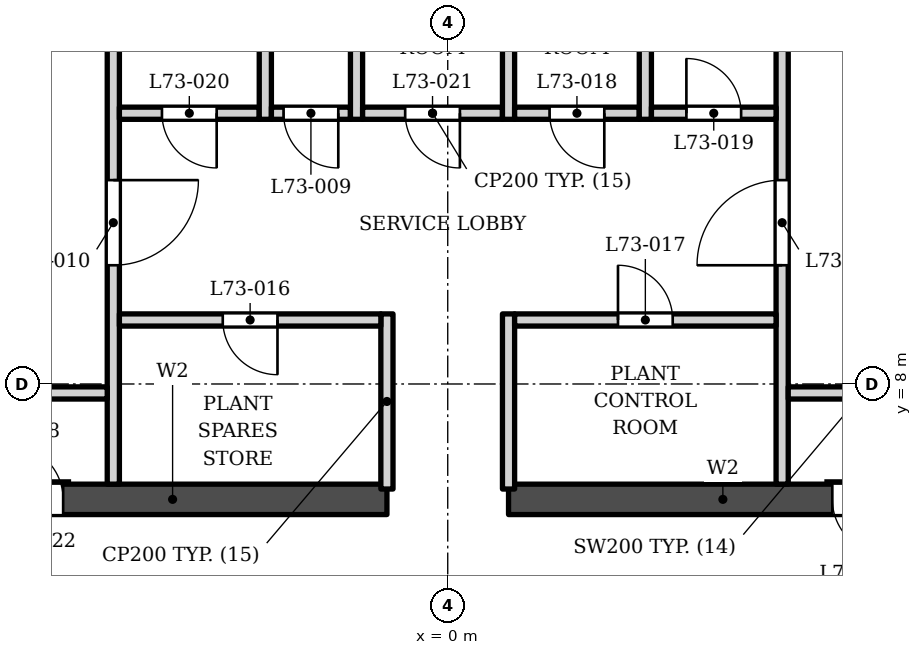
"""IFC4 building model, lengths in metres.
Left out: names, types, materials, properties, quantities, classifications, styles, units other than length and angle.
Written with IfcOpenShell. Run it as: python <this file> out.ifc"""

import sys

from ifc_helpers import new_model, si_unit, direction, frame, frame_2d, origin, place, context, subcontext, project, spatial, rectangle, extrude, element, fill, save


model = new_model("IFC4")
c1 = context("Model", 3, precision=1e-05, world=origin(), true_north=direction((0.0, 1.0)))
c2 = subcontext(c1, "Body", "Model", "MODEL_VIEW")
j1 = project(units=[si_unit("LENGTHUNIT", "METRE"), si_unit("PLANEANGLEUNIT", "RADIAN")], contexts=[c1])
p1 = place(None, origin())
s1 = spatial("IfcSite", under=j1, at=p1, CompositionType="ELEMENT")
p2 = place(p1, origin())
s2 = spatial("IfcBuilding", under=s1, at=p2, CompositionType="ELEMENT")
p3 = place(p2, frame((0.0, 0.0, 310.5)))
s3 = spatial("IfcBuildingStorey", under=s2, at=p3, CompositionType="ELEMENT", Elevation=310.5)
p4 = place(p3, frame((-8.05, 6.103, 0.0), z_axis=(0.0, 0.0, 1.0), x_axis=(1.0, 0.0, 0.0)))
e1 = element("IfcWall", 1, at=p4, inside=s3, PredefinedType="SHEAR", context=c2, shape_type="SweptSolid", body=[
    extrude(rectangle(XDim=7.05, YDim=0.5, at=frame_2d((3.525, 0.0))), origin(), (0.0, 0.0, 1.0), 5.0),
])
p5 = place(p4, frame((0.825, 0.0, 0.0)))
e2 = element("IfcOpeningElement", 2, at=p5, cuts=e1, PredefinedType="OPENING", context=c2, shape_type="SweptSolid", body=[
    extrude(rectangle(XDim=0.9, YDim=2.1, at=frame_2d((0.45, 1.05))), frame((0.0, 0.26, 0.0), z_axis=(0.0, -1.0, 0.0), x_axis=(1.0, 0.0, 0.0)), (0.0, 0.0, 1.0), 0.52),
])
p6 = place(p3, frame((1.0, 6.103, 0.0), z_axis=(0.0, 0.0, 1.0), x_axis=(1.0, 0.0, 0.0)))
e3 = element("IfcWall", 3, at=p6, inside=s3, PredefinedType="SHEAR", context=c2, shape_type="SweptSolid", body=[
    extrude(rectangle(XDim=7.05, YDim=0.5, at=frame_2d((3.525, 0.0))), origin(), (0.0, 0.0, 1.0), 5.0),
])
p7 = place(p6, frame((5.325, 0.0, 0.0)))
e4 = element("IfcOpeningElement", 4, at=p7, cuts=e3, PredefinedType="OPENING", context=c2, shape_type="SweptSolid", body=[
    extrude(rectangle(XDim=0.9, YDim=2.1, at=frame_2d((0.45, 1.05))), frame((0.0, 0.26, 0.0), z_axis=(0.0, -1.0, 0.0), x_axis=(1.0, 0.0, 0.0)), (0.0, 0.0, 1.0), 0.52),
])
for number, where, z_axis, x_axis in (
    (5, (-1.0, 6.273, 0.0), (0.0, 0.0, 1.0), (0.0, 1.0, 0.0)),
    (6, (1.0, 6.273, 0.0), (0.0, 0.0, 1.0), (0.0, 1.0, 0.0)),
):
    element("IfcWall", number, at=place(p3, frame(where, z_axis=z_axis, x_axis=x_axis)), inside=s3, PredefinedType="PARTITIONING", context=c2, shape_type="SweptSolid", body=[
        extrude(rectangle(XDim=2.88, YDim=0.2, at=frame_2d((1.44, 0.0))), origin(), (0.0, 0.0, 1.0), 4.8),
    ])
p8 = place(p3, frame((-5.5, 6.353, 0.0), z_axis=(0.0, 0.0, 1.0), x_axis=(0.0, 1.0, 0.0)))
e7 = element("IfcWall", 7, at=p8, inside=s3, PredefinedType="SOLIDWALL", context=c2, shape_type="SweptSolid", body=[
    extrude(rectangle(XDim=7.85, YDim=0.2, at=frame_2d((3.925, 0.0))), origin(), (0.0, 0.0, 1.0), 4.8),
])
p9 = place(p8, frame((3.6, 0.0, 0.0)))
e8 = element("IfcOpeningElement", 8, at=p9, cuts=e7, PredefinedType="OPENING", context=c2, shape_type="SweptSolid", body=[
    extrude(rectangle(XDim=1.4, YDim=2.1, at=frame_2d((0.7, 1.05))), frame((0.0, 0.11, 0.0), z_axis=(0.0, -1.0, 0.0), x_axis=(1.0, 0.0, 0.0)), (0.0, 0.0, 1.0), 0.22),
])
p10 = place(p3, frame((5.5, 6.353, 0.0), z_axis=(0.0, 0.0, 1.0), x_axis=(0.0, 1.0, 0.0)))
e9 = element("IfcWall", 9, at=p10, inside=s3, PredefinedType="SOLIDWALL", context=c2, shape_type="SweptSolid", body=[
    extrude(rectangle(XDim=7.85, YDim=0.2, at=frame_2d((3.925, 0.0))), origin(), (0.0, 0.0, 1.0), 4.8),
])
p11 = place(p10, frame((3.6, 0.0, 0.0)))
e10 = element("IfcOpeningElement", 10, at=p11, cuts=e9, PredefinedType="OPENING", context=c2, shape_type="SweptSolid", body=[
    extrude(rectangle(XDim=1.4, YDim=2.1, at=frame_2d((0.7, 1.05))), frame((0.0, 0.11, 0.0), z_axis=(0.0, -1.0, 0.0), x_axis=(1.0, 0.0, 0.0)), (0.0, 0.0, 1.0), 0.22),
])
for number, where, z_axis, x_axis in (
    (11, (-8.05, 7.853, 0.0), (0.0, 0.0, 1.0), (1.0, 0.0, 0.0)),
    (12, (5.6, 7.853, 0.0), (0.0, 0.0, 1.0), (1.0, 0.0, 0.0)),
):
    element("IfcWall", number, at=place(p3, frame(where, z_axis=z_axis, x_axis=x_axis)), inside=s3, PredefinedType="SOLIDWALL", context=c2, shape_type="SweptSolid", body=[
        extrude(rectangle(XDim=2.45, YDim=0.2, at=frame_2d((1.225, 0.0))), origin(), (0.0, 0.0, 1.0), 4.8),
    ])
p12 = place(p3, frame((-5.4, 9.052, 0.0), z_axis=(0.0, 0.0, 1.0), x_axis=(1.0, 0.0, 0.0)))
e13 = element("IfcWall", 13, at=p12, inside=s3, PredefinedType="PARTITIONING", context=c2, shape_type="SweptSolid", body=[
    extrude(rectangle(XDim=4.3, YDim=0.2, at=frame_2d((2.15, 0.0))), origin(), (0.0, 0.0, 1.0), 4.8),
])
p13 = place(p12, frame((1.7, 0.0, 0.0)))
e14 = element("IfcOpeningElement", 14, at=p13, cuts=e13, PredefinedType="OPENING", context=c2, shape_type="SweptSolid", body=[
    extrude(rectangle(XDim=0.9, YDim=2.1, at=frame_2d((0.45, 1.05))), frame((0.0, 0.11, 0.0), z_axis=(0.0, -1.0, 0.0), x_axis=(1.0, 0.0, 0.0)), (0.0, 0.0, 1.0), 0.22),
])
p14 = place(p3, frame((1.1, 9.052, 0.0), z_axis=(0.0, 0.0, 1.0), x_axis=(1.0, 0.0, 0.0)))
e15 = element("IfcWall", 15, at=p14, inside=s3, PredefinedType="PARTITIONING", context=c2, shape_type="SweptSolid", body=[
    extrude(rectangle(XDim=4.3, YDim=0.2, at=frame_2d((2.15, 0.0))), origin(), (0.0, 0.0, 1.0), 4.8),
])
p15 = place(p14, frame((1.7, 0.0, 0.0)))
e16 = element("IfcOpeningElement", 16, at=p15, cuts=e15, PredefinedType="OPENING", context=c2, shape_type="SweptSolid", body=[
    extrude(rectangle(XDim=0.9, YDim=2.1, at=frame_2d((0.45, 1.05))), frame((0.0, 0.11, 0.0), z_axis=(0.0, -1.0, 0.0), x_axis=(1.0, 0.0, 0.0)), (0.0, 0.0, 1.0), 0.22),
])
p16 = place(p3, frame((-5.4, 12.453, 0.0), z_axis=(0.0, 0.0, 1.0), x_axis=(1.0, 0.0, 0.0)))
e17 = element("IfcWall", 17, at=p16, inside=s3, PredefinedType="PARTITIONING", context=c2, shape_type="SweptSolid", body=[
    extrude(rectangle(XDim=2.3, YDim=0.2, at=frame_2d((1.15, 0.0))), origin(), (0.0, 0.0, 1.0), 4.8),
])
p17 = place(p16, frame((0.7, 0.0, 0.0)))
e18 = element("IfcOpeningElement", 18, at=p17, cuts=e17, PredefinedType="OPENING", context=c2, shape_type="SweptSolid", body=[
    extrude(rectangle(XDim=0.9, YDim=2.1, at=frame_2d((0.45, 1.05))), frame((0.0, 0.11, 0.0), z_axis=(0.0, -1.0, 0.0), x_axis=(1.0, 0.0, 0.0)), (0.0, 0.0, 1.0), 0.22),
])
p18 = place(p3, frame((-3.0, 12.353, 0.0), z_axis=(0.0, 0.0, 1.0), x_axis=(0.0, 1.0, 0.0)))
e19 = element("IfcWall", 19, at=p18, inside=s3, PredefinedType="PARTITIONING", context=c2, shape_type="SweptSolid", body=[
    extrude(rectangle(XDim=6.2, YDim=0.2, at=frame_2d((3.1, 0.0))), origin(), (0.0, 0.0, 1.0), 4.8),
])
p19 = place(p18, frame((3.425, 0.0, 0.0)))
e20 = element("IfcOpeningElement", 20, at=p19, cuts=e19, PredefinedType="OPENING", context=c2, shape_type="SweptSolid", body=[
    extrude(rectangle(XDim=0.9, YDim=2.1, at=frame_2d((0.45, 1.05))), frame((0.0, 0.11, 0.0), z_axis=(0.0, -1.0, 0.0), x_axis=(1.0, 0.0, 0.0)), (0.0, 0.0, 1.0), 0.22),
])
p20 = place(p18, frame((4.975, 0.0, 0.0)))
e21 = element("IfcOpeningElement", 21, at=p20, cuts=e19, PredefinedType="OPENING", context=c2, shape_type="SweptSolid", body=[
    extrude(rectangle(XDim=0.9, YDim=2.1, at=frame_2d((0.45, 1.05))), frame((0.0, 0.11, 0.0), z_axis=(0.0, -1.0, 0.0), x_axis=(1.0, 0.0, 0.0)), (0.0, 0.0, 1.0), 0.22),
])
p21 = place(p3, frame((-2.9, 12.453, 0.0), z_axis=(0.0, 0.0, 1.0), x_axis=(1.0, 0.0, 0.0)))
e22 = element("IfcWall", 22, at=p21, inside=s3, PredefinedType="PARTITIONING", context=c2, shape_type="SweptSolid", body=[
    extrude(rectangle(XDim=1.3, YDim=0.2, at=frame_2d((0.65, 0.0))), origin(), (0.0, 0.0, 1.0), 4.8),
])
p22 = place(p21, frame((0.2, 0.0, 0.0)))
e23 = element("IfcOpeningElement", 23, at=p22, cuts=e22, PredefinedType="OPENING", context=c2, shape_type="SweptSolid", body=[
    extrude(rectangle(XDim=0.9, YDim=2.1, at=frame_2d((0.45, 1.05))), frame((0.0, 0.11, 0.0), z_axis=(0.0, -1.0, 0.0), x_axis=(1.0, 0.0, 0.0)), (0.0, 0.0, 1.0), 0.22),
])
p23 = place(p3, frame((-1.5, 12.353, 0.0), z_axis=(0.0, 0.0, 1.0), x_axis=(0.0, 1.0, 0.0)))
e24 = element("IfcWall", 24, at=p23, inside=s3, PredefinedType="PARTITIONING", context=c2, shape_type="SweptSolid", body=[
    extrude(rectangle(XDim=6.2, YDim=0.2, at=frame_2d((3.1, 0.0))), origin(), (0.0, 0.0, 1.0), 4.8),
])
p24 = place(p23, frame((3.27, 0.0, 0.0)))
e25 = element("IfcOpeningElement", 25, at=p24, cuts=e24, PredefinedType="OPENING", context=c2, shape_type="SweptSolid", body=[
    extrude(rectangle(XDim=0.9, YDim=2.1, at=frame_2d((0.45, 1.05))), frame((0.0, 0.11, 0.0), z_axis=(0.0, -1.0, 0.0), x_axis=(1.0, 0.0, 0.0)), (0.0, 0.0, 1.0), 0.22),
])
p25 = place(p23, frame((4.82, 0.0, 0.0)))
e26 = element("IfcOpeningElement", 26, at=p25, cuts=e24, PredefinedType="OPENING", context=c2, shape_type="SweptSolid", body=[
    extrude(rectangle(XDim=0.9, YDim=2.1, at=frame_2d((0.45, 1.05))), frame((0.0, 0.11, 0.0), z_axis=(0.0, -1.0, 0.0), x_axis=(1.0, 0.0, 0.0)), (0.0, 0.0, 1.0), 0.22),
])
p26 = place(p3, frame((-1.4, 12.453, 0.0), z_axis=(0.0, 0.0, 1.0), x_axis=(1.0, 0.0, 0.0)))
e27 = element("IfcWall", 27, at=p26, inside=s3, PredefinedType="PARTITIONING", context=c2, shape_type="SweptSolid", body=[
    extrude(rectangle(XDim=2.3, YDim=0.2, at=frame_2d((1.15, 0.0))), origin(), (0.0, 0.0, 1.0), 4.8),
])
p27 = place(p26, frame((0.7, 0.0, 0.0)))
e28 = element("IfcOpeningElement", 28, at=p27, cuts=e27, PredefinedType="OPENING", context=c2, shape_type="SweptSolid", body=[
    extrude(rectangle(XDim=0.9, YDim=2.1, at=frame_2d((0.45, 1.05))), frame((0.0, 0.11, 0.0), z_axis=(0.0, -1.0, 0.0), x_axis=(1.0, 0.0, 0.0)), (0.0, 0.0, 1.0), 0.22),
])
p28 = place(p3, frame((1.0, 12.353, 0.0), z_axis=(0.0, 0.0, 1.0), x_axis=(0.0, 1.0, 0.0)))
e29 = element("IfcWall", 29, at=p28, inside=s3, PredefinedType="PARTITIONING", context=c2, shape_type="SweptSolid", body=[
    extrude(rectangle(XDim=3.2, YDim=0.2, at=frame_2d((1.6, 0.0))), origin(), (0.0, 0.0, 1.0), 4.8),
])
p29 = place(p3, frame((1.1, 12.453, 0.0), z_axis=(0.0, 0.0, 1.0), x_axis=(1.0, 0.0, 0.0)))
e30 = element("IfcWall", 30, at=p29, inside=s3, PredefinedType="PARTITIONING", context=c2, shape_type="SweptSolid", body=[
    extrude(rectangle(XDim=2.05, YDim=0.2, at=frame_2d((1.025, 0.0))), origin(), (0.0, 0.0, 1.0), 4.8),
])
p30 = place(p29, frame((0.575, 0.0, 0.0)))
e31 = element("IfcOpeningElement", 31, at=p30, cuts=e30, PredefinedType="OPENING", context=c2, shape_type="SweptSolid", body=[
    extrude(rectangle(XDim=0.9, YDim=2.1, at=frame_2d((0.45, 1.05))), frame((0.0, 0.11, 0.0), z_axis=(0.0, -1.0, 0.0), x_axis=(1.0, 0.0, 0.0)), (0.0, 0.0, 1.0), 0.22),
])
p31 = place(p3, frame((3.25, 12.353, 0.0), z_axis=(0.0, 0.0, 1.0), x_axis=(0.0, 1.0, 0.0)))
e32 = element("IfcWall", 32, at=p31, inside=s3, PredefinedType="PARTITIONING", context=c2, shape_type="SweptSolid", body=[
    extrude(rectangle(XDim=3.2, YDim=0.2, at=frame_2d((1.6, 0.0))), origin(), (0.0, 0.0, 1.0), 4.8),
])
p32 = place(p3, frame((3.35, 12.453, 0.0), z_axis=(0.0, 0.0, 1.0), x_axis=(1.0, 0.0, 0.0)))
e33 = element("IfcWall", 33, at=p32, inside=s3, PredefinedType="PARTITIONING", context=c2, shape_type="SweptSolid", body=[
    extrude(rectangle(XDim=2.05, YDim=0.2, at=frame_2d((1.025, 0.0))), origin(), (0.0, 0.0, 1.0), 4.8),
])
p33 = place(p32, frame((0.575, 0.0, 0.0)))
e34 = element("IfcOpeningElement", 34, at=p33, cuts=e33, PredefinedType="OPENING", context=c2, shape_type="SweptSolid", body=[
    extrude(rectangle(XDim=0.9, YDim=2.1, at=frame_2d((0.45, 1.05))), frame((0.0, 0.11, 0.0), z_axis=(0.0, -1.0, 0.0), x_axis=(1.0, 0.0, 0.0)), (0.0, 0.0, 1.0), 0.22),
])
p34 = place(p22, origin())
e35 = element("IfcDoor", 35, at=p34, inside=s3, OperationType="SINGLE_SWING_RIGHT", PredefinedType="DOOR", context=c2, shape_type="SweptSolid", body=[
    extrude(rectangle(XDim=0.9, YDim=2.1, at=frame_2d((0.45, 1.05))), frame((0.0, 0.025, 0.0), z_axis=(0.0, -1.0, 0.0), x_axis=(1.0, 0.0, 0.0)), (0.0, 0.0, 1.0), 0.05),
])
fill(e23, e35)
p35 = place(p9, origin())
e36 = element("IfcDoor", 36, at=p35, inside=s3, OperationType="SINGLE_SWING_RIGHT", PredefinedType="DOOR", context=c2, shape_type="SweptSolid", body=[
    extrude(rectangle(XDim=1.4, YDim=2.1, at=frame_2d((0.7, 1.05))), frame((0.0, 0.025, 0.0), z_axis=(0.0, -1.0, 0.0), x_axis=(1.0, 0.0, 0.0)), (0.0, 0.0, 1.0), 0.05),
])
fill(e8, e36)
p36 = place(p11, origin())
e37 = element("IfcDoor", 37, at=p36, inside=s3, OperationType="SINGLE_SWING_LEFT", PredefinedType="DOOR", context=c2, shape_type="SweptSolid", body=[
    extrude(rectangle(XDim=1.4, YDim=2.1, at=frame_2d((0.7, 1.05))), frame((0.0, 0.025, 0.0), z_axis=(0.0, -1.0, 0.0), x_axis=(1.0, 0.0, 0.0)), (0.0, 0.0, 1.0), 0.05),
])
fill(e10, e37)
p37 = place(p13, origin())
e38 = element("IfcDoor", 38, at=p37, inside=s3, OperationType="SINGLE_SWING_RIGHT", PredefinedType="DOOR", context=c2, shape_type="SweptSolid", body=[
    extrude(rectangle(XDim=0.9, YDim=2.1, at=frame_2d((0.45, 1.05))), frame((0.0, 0.025, 0.0), z_axis=(0.0, -1.0, 0.0), x_axis=(1.0, 0.0, 0.0)), (0.0, 0.0, 1.0), 0.05),
])
fill(e14, e38)
p38 = place(p15, origin())
e39 = element("IfcDoor", 39, at=p38, inside=s3, OperationType="SINGLE_SWING_LEFT", PredefinedType="DOOR", context=c2, shape_type="SweptSolid", body=[
    extrude(rectangle(XDim=0.9, YDim=2.1, at=frame_2d((0.45, 1.05))), frame((0.0, 0.025, 0.0), z_axis=(0.0, -1.0, 0.0), x_axis=(1.0, 0.0, 0.0)), (0.0, 0.0, 1.0), 0.05),
])
fill(e16, e39)
p39 = place(p30, origin())
e40 = element("IfcDoor", 40, at=p39, inside=s3, OperationType="SINGLE_SWING_RIGHT", PredefinedType="DOOR", context=c2, shape_type="SweptSolid", body=[
    extrude(rectangle(XDim=0.9, YDim=2.1, at=frame_2d((0.45, 1.05))), frame((0.0, 0.025, 0.0), z_axis=(0.0, -1.0, 0.0), x_axis=(1.0, 0.0, 0.0)), (0.0, 0.0, 1.0), 0.05),
])
fill(e31, e40)
p40 = place(p33, origin())
e41 = element("IfcDoor", 41, at=p40, inside=s3, OperationType="SINGLE_SWING_LEFT", PredefinedType="DOOR", context=c2, shape_type="SweptSolid", body=[
    extrude(rectangle(XDim=0.9, YDim=2.1, at=frame_2d((0.45, 1.05))), frame((0.0, 0.025, 0.0), z_axis=(0.0, -1.0, 0.0), x_axis=(1.0, 0.0, 0.0)), (0.0, 0.0, 1.0), 0.05),
])
fill(e34, e41)
p41 = place(p17, origin())
e42 = element("IfcDoor", 42, at=p41, inside=s3, OperationType="SINGLE_SWING_RIGHT", PredefinedType="DOOR", context=c2, shape_type="SweptSolid", body=[
    extrude(rectangle(XDim=0.9, YDim=2.1, at=frame_2d((0.45, 1.05))), frame((0.0, 0.025, 0.0), z_axis=(0.0, -1.0, 0.0), x_axis=(1.0, 0.0, 0.0)), (0.0, 0.0, 1.0), 0.05),
])
fill(e18, e42)
p42 = place(p27, origin())
e43 = element("IfcDoor", 43, at=p42, inside=s3, OperationType="SINGLE_SWING_RIGHT", PredefinedType="DOOR", context=c2, shape_type="SweptSolid", body=[
    extrude(rectangle(XDim=0.9, YDim=2.1, at=frame_2d((0.45, 1.05))), frame((0.0, 0.025, 0.0), z_axis=(0.0, -1.0, 0.0), x_axis=(1.0, 0.0, 0.0)), (0.0, 0.0, 1.0), 0.05),
])
fill(e28, e43)
p43 = place(p5, origin())
e44 = element("IfcDoor", 44, at=p43, inside=s3, OperationType="SINGLE_SWING_LEFT", PredefinedType="DOOR", context=c2, shape_type="SweptSolid", body=[
    extrude(rectangle(XDim=0.9, YDim=2.1, at=frame_2d((0.45, 1.05))), frame((0.0, 0.025, 0.0), z_axis=(0.0, -1.0, 0.0), x_axis=(1.0, 0.0, 0.0)), (0.0, 0.0, 1.0), 0.05),
])
fill(e2, e44)
p44 = place(p7, origin())
e45 = element("IfcDoor", 45, at=p44, inside=s3, OperationType="SINGLE_SWING_RIGHT", PredefinedType="DOOR", context=c2, shape_type="SweptSolid", body=[
    extrude(rectangle(XDim=0.9, YDim=2.1, at=frame_2d((0.45, 1.05))), frame((0.0, 0.025, 0.0), z_axis=(0.0, -1.0, 0.0), x_axis=(1.0, 0.0, 0.0)), (0.0, 0.0, 1.0), 0.05),
])
fill(e4, e45)
save(model, sys.argv[1])
